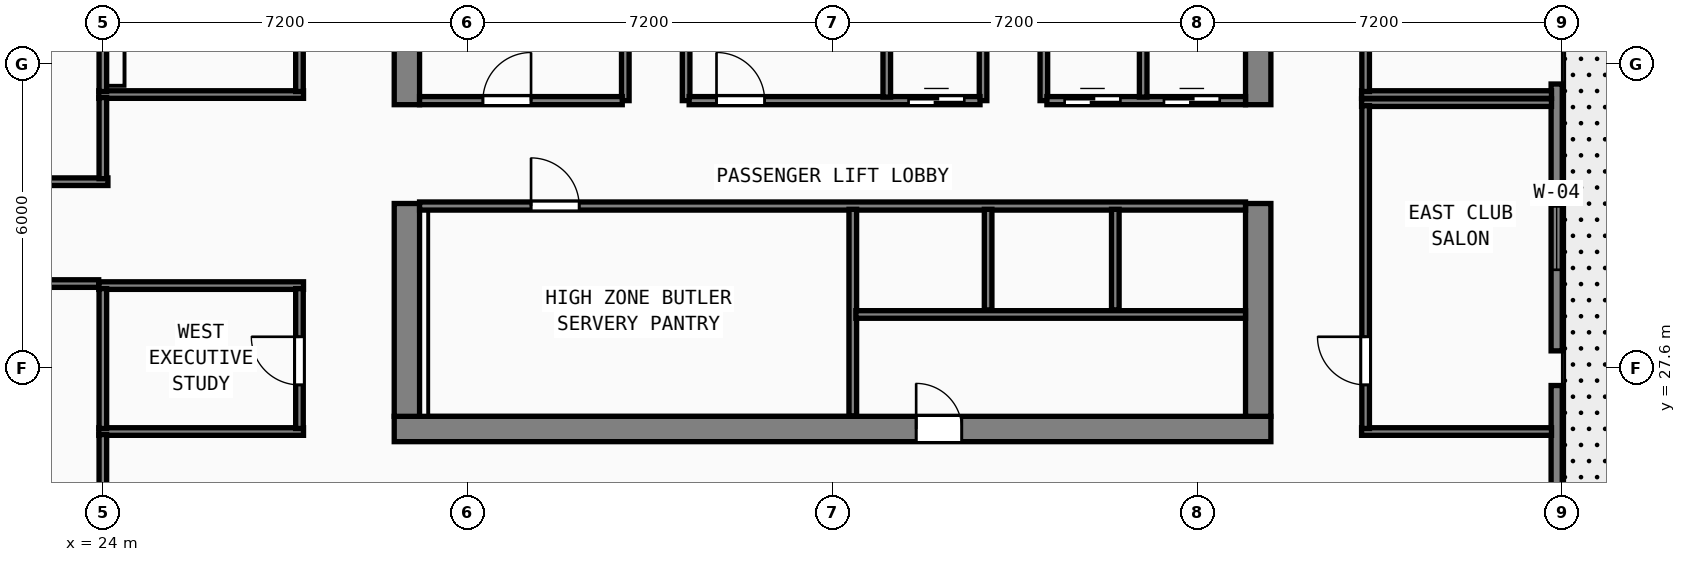
"""IFC4 building model, lengths in metres.
Left out: names, types, materials, properties, quantities, classifications, styles, units other than length and angle.
Written with IfcOpenShell. Run it as: python <this file> out.ifc"""

import sys

from ifc_helpers import new_model, si_unit, direction, frame, frame_2d, origin, origin_2d, place, context, subcontext, project, spatial, rectangle, hollow_rectangle, extrude, element, fill, save


model = new_model("IFC4")
c1 = context("Model", 3, precision=1e-05, world=origin(), true_north=direction((0.0, 1.0)))
c2 = subcontext(c1, "Body", "Model", "MODEL_VIEW")
j1 = project(units=[si_unit("LENGTHUNIT", "METRE"), si_unit("PLANEANGLEUNIT", "RADIAN")], contexts=[c1])
p1 = place(None, origin())
s1 = spatial("IfcSite", under=j1, at=p1, CompositionType="ELEMENT")
p2 = place(p1, origin())
s2 = spatial("IfcBuilding", under=s1, at=p2, CompositionType="ELEMENT")
p3 = place(p2, frame((0.0, 0.0, 235.2)))
s3 = spatial("IfcBuildingStorey", under=s2, at=p3, CompositionType="ELEMENT", Elevation=235.2)
p4 = place(p3, frame((29.75, 26.4, 0.0), z_axis=(0.0, 0.0, 1.0), x_axis=(1.0, 0.0, 0.0)))
e1 = element("IfcWall", 1, at=p4, inside=s3, PredefinedType="SHEAR", context=c2, shape_type="SweptSolid", body=[
    extrude(rectangle(XDim=17.3, YDim=0.5, at=frame_2d((8.65, 0.0))), origin(), (0.0, 0.0, 1.0), 3.67),
])
p5 = place(p4, frame((11.2, 0.0, 0.0), z_axis=(0.0, 0.0, 1.0), x_axis=(-1.0, 0.0, 0.0)))
e2 = element("IfcOpeningElement", 2, at=p5, cuts=e1, PredefinedType="OPENING", context=c2, shape_type="SweptSolid", body=[
    extrude(rectangle(XDim=0.9, YDim=2.1, at=frame_2d((0.45, 1.05))), frame((0.0, 0.26, 0.0), z_axis=(0.0, -1.0, 0.0), x_axis=(1.0, 0.0, 0.0)), (0.0, 0.0, 1.0), 0.52),
])
p6 = place(p3, frame((30.0, 26.65, 0.0), z_axis=(0.0, 0.0, 1.0), x_axis=(0.0, 1.0, 0.0)))
e3 = element("IfcWall", 3, at=p6, inside=s3, PredefinedType="SHEAR", context=c2, shape_type="SweptSolid", body=[
    extrude(rectangle(XDim=4.2, YDim=0.5, at=frame_2d((2.1, 0.0))), origin(), (0.0, 0.0, 1.0), 3.67),
])
p7 = place(p3, frame((30.0, 32.8, 0.0), z_axis=(0.0, 0.0, 1.0), x_axis=(0.0, 1.0, 0.0)))
e4 = element("IfcWall", 4, at=p7, inside=s3, PredefinedType="SHEAR", context=c2, shape_type="SweptSolid", body=[
    extrude(rectangle(XDim=10.15, YDim=0.5, at=frame_2d((5.075, 0.0))), origin(), (0.0, 0.0, 1.0), 3.67),
])
p8 = place(p3, frame((46.8, 26.65, 0.0), z_axis=(0.0, 0.0, 1.0), x_axis=(0.0, 1.0, 0.0)))
e5 = element("IfcWall", 5, at=p8, inside=s3, PredefinedType="SHEAR", context=c2, shape_type="SweptSolid", body=[
    extrude(rectangle(XDim=4.2, YDim=0.5, at=frame_2d((2.1, 0.0))), origin(), (0.0, 0.0, 1.0), 3.67),
])
p9 = place(p3, frame((46.8, 32.8, 0.0), z_axis=(0.0, 0.0, 1.0), x_axis=(0.0, 1.0, 0.0)))
e6 = element("IfcWall", 6, at=p9, inside=s3, PredefinedType="SHEAR", context=c2, shape_type="SweptSolid", body=[
    extrude(rectangle(XDim=10.15, YDim=0.5, at=frame_2d((5.075, 0.0))), origin(), (0.0, 0.0, 1.0), 3.67),
])
for number, where, z_axis, x_axis in (
    (7, (24.0, 33.6, 0.0), (0.0, 0.0, 1.0), (1.0, 0.0, 0.0)),
    (8, (52.8, 33.6, 0.0), (0.0, 0.0, 1.0), (1.0, 0.0, 0.0)),
):
    element("IfcColumn", number, at=place(p3, frame(where, z_axis=z_axis, x_axis=x_axis)), inside=s3, PredefinedType="COLUMN", context=c2, shape_type="SweptSolid", body=[
        extrude(hollow_rectangle(XDim=0.8, YDim=0.8, WallThickness=0.03, at=origin_2d()), origin(), (0.0, 0.0, 1.0), 3.85),
    ])
for number, where, z_axis, x_axis in (
    (9, (24.0, 27.6, 0.0), (0.0, 0.0, 1.0), (1.0, 0.0, 0.0)),
    (10, (52.8, 27.6, 0.0), (0.0, 0.0, 1.0), (1.0, 0.0, 0.0)),
):
    element("IfcColumn", number, at=place(p3, frame(where, z_axis=z_axis, x_axis=x_axis)), inside=s3, PredefinedType="COLUMN", context=c2, shape_type="SweptSolid", body=[
        extrude(hollow_rectangle(XDim=0.7, YDim=0.7, WallThickness=0.026, at=origin_2d()), origin(), (0.0, 0.0, 1.0), 3.85),
    ])
p10 = place(p3, frame((52.69, 21.992, 0.0), z_axis=(0.0, 0.0, 1.0), x_axis=(0.0, 1.0, 0.0)))
e11 = element("IfcWall", 11, at=p10, inside=s3, PredefinedType="SOLIDWALL", context=c2, shape_type="SweptSolid", body=[
    extrude(rectangle(XDim=5.266, YDim=0.22, at=frame_2d((2.633, 0.0))), origin(), (0.0, 0.0, 1.0), 3.315),
])
p11 = place(p10, frame((1.72, 0.0, 0.0), z_axis=(0.0, 0.0, 1.0), x_axis=(-1.0, 0.0, 0.0)))
e12 = element("IfcOpeningElement", 12, at=p11, cuts=e11, PredefinedType="OPENING", context=c2, shape_type="SweptSolid", body=[
    extrude(rectangle(XDim=1.5, YDim=2.2, at=frame_2d((0.75, 1.1))), frame((0.0, 0.12, 0.0), z_axis=(0.0, -1.0, 0.0), x_axis=(1.0, 0.0, 0.0)), (0.0, 0.0, 1.0), 0.24),
])
p12 = place(p3, frame((52.69, 27.942, 0.0), z_axis=(0.0, 0.0, 1.0), x_axis=(0.0, 1.0, 0.0)))
e13 = element("IfcWall", 13, at=p12, inside=s3, PredefinedType="SOLIDWALL", context=c2, shape_type="SweptSolid", body=[
    extrude(rectangle(XDim=5.266, YDim=0.22, at=frame_2d((2.633, 0.0))), origin(), (0.0, 0.0, 1.0), 3.315),
])
p13 = place(p12, frame((1.6, 0.0, 0.85)))
e14 = element("IfcOpeningElement", 14, at=p13, cuts=e13, PredefinedType="OPENING", context=c2, shape_type="SweptSolid", body=[
    extrude(rectangle(XDim=1.25, YDim=1.95, at=frame_2d((0.625, 0.975))), frame((0.0, 0.12, 0.0), z_axis=(0.0, -1.0, 0.0), x_axis=(1.0, 0.0, 0.0)), (0.0, 0.0, 1.0), 0.24),
])
for number, where, z_axis, x_axis in (
    (15, (34.31, 32.88, 0.0), (0.0, 0.0, 1.0), (0.0, 1.0, 0.0)),
    (16, (35.51, 32.88, 0.0), (0.0, 0.0, 1.0), (0.0, 1.0, 0.0)),
    (17, (41.37, 32.88, 0.0), (0.0, 0.0, 1.0), (0.0, 1.0, 0.0)),
    (18, (42.57, 32.88, 0.0), (0.0, 0.0, 1.0), (0.0, 1.0, 0.0)),
):
    element("IfcWall", number, at=place(p3, frame(where, z_axis=z_axis, x_axis=x_axis)), inside=s3, PredefinedType="SOLIDWALL", context=c2, shape_type="SweptSolid", body=[
        extrude(rectangle(XDim=2.17, YDim=0.15, at=frame_2d((1.085, 0.0))), origin(), (0.0, 0.0, 1.0), 3.67),
    ])
p14 = place(p3, frame((30.25, 32.88, 0.0), z_axis=(0.0, 0.0, 1.0), x_axis=(1.0, 0.0, 0.0)))
e19 = element("IfcWall", 19, at=p14, inside=s3, PredefinedType="SOLIDWALL", context=c2, shape_type="SweptSolid", body=[
    extrude(rectangle(XDim=4.0, YDim=0.16, at=frame_2d((2.0, 0.0))), origin(), (0.0, 0.0, 1.0), 3.67),
])
p15 = place(p14, frame((2.2, 0.0, 0.0), z_axis=(0.0, 0.0, 1.0), x_axis=(-1.0, 0.0, 0.0)))
e20 = element("IfcOpeningElement", 20, at=p15, cuts=e19, PredefinedType="OPENING", context=c2, shape_type="SweptSolid", body=[
    extrude(rectangle(XDim=0.95, YDim=2.12, at=frame_2d((0.475, 1.06))), frame((0.0, 0.09, 0.0), z_axis=(0.0, -1.0, 0.0), x_axis=(1.0, 0.0, 0.0)), (0.0, 0.0, 1.0), 0.18),
])
p16 = place(p3, frame((35.57, 32.88, 0.0), z_axis=(0.0, 0.0, 1.0), x_axis=(1.0, 0.0, 0.0)))
e21 = element("IfcWall", 21, at=p16, inside=s3, PredefinedType="SOLIDWALL", context=c2, shape_type="SweptSolid", body=[
    extrude(rectangle(XDim=5.74, YDim=0.16, at=frame_2d((2.87, 0.0))), origin(), (0.0, 0.0, 1.0), 3.67),
])
p17 = place(p16, frame((1.49, 0.0, 0.0), z_axis=(0.0, 0.0, 1.0), x_axis=(-1.0, 0.0, 0.0)))
e22 = element("IfcOpeningElement", 22, at=p17, cuts=e21, PredefinedType="OPENING", context=c2, shape_type="SweptSolid", body=[
    extrude(rectangle(XDim=0.95, YDim=2.12, at=frame_2d((0.475, 1.06))), frame((0.0, 0.09, 0.0), z_axis=(0.0, -1.0, 0.0), x_axis=(1.0, 0.0, 0.0)), (0.0, 0.0, 1.0), 0.18),
])
p18 = place(p16, frame((5.43, 0.0, 0.0), z_axis=(0.0, 0.0, 1.0), x_axis=(-1.0, 0.0, 0.0)))
e23 = element("IfcOpeningElement", 23, at=p18, cuts=e21, PredefinedType="OPENING", context=c2, shape_type="SweptSolid", body=[
    extrude(rectangle(XDim=1.1, YDim=2.2, at=frame_2d((0.55, 1.1))), frame((0.0, 0.09, 0.0), z_axis=(0.0, -1.0, 0.0), x_axis=(1.0, 0.0, 0.0)), (0.0, 0.0, 1.0), 0.18),
])
p19 = place(p3, frame((42.63, 32.88, 0.0), z_axis=(0.0, 0.0, 1.0), x_axis=(1.0, 0.0, 0.0)))
e24 = element("IfcWall", 24, at=p19, inside=s3, PredefinedType="SOLIDWALL", context=c2, shape_type="SweptSolid", body=[
    extrude(rectangle(XDim=3.92, YDim=0.16, at=frame_2d((1.96, 0.0))), origin(), (0.0, 0.0, 1.0), 3.67),
])
p20 = place(p19, frame((1.45, 0.0, 0.0), z_axis=(0.0, 0.0, 1.0), x_axis=(-1.0, 0.0, 0.0)))
e25 = element("IfcOpeningElement", 25, at=p20, cuts=e24, PredefinedType="OPENING", context=c2, shape_type="SweptSolid", body=[
    extrude(rectangle(XDim=1.1, YDim=2.2, at=frame_2d((0.55, 1.1))), frame((0.0, 0.09, 0.0), z_axis=(0.0, -1.0, 0.0), x_axis=(1.0, 0.0, 0.0)), (0.0, 0.0, 1.0), 0.18),
])
p21 = place(p19, frame((3.41, 0.0, 0.0), z_axis=(0.0, 0.0, 1.0), x_axis=(-1.0, 0.0, 0.0)))
e26 = element("IfcOpeningElement", 26, at=p21, cuts=e24, PredefinedType="OPENING", context=c2, shape_type="SweptSolid", body=[
    extrude(rectangle(XDim=1.1, YDim=2.2, at=frame_2d((0.55, 1.1))), frame((0.0, 0.09, 0.0), z_axis=(0.0, -1.0, 0.0), x_axis=(1.0, 0.0, 0.0)), (0.0, 0.0, 1.0), 0.18),
])
for number, where, z_axis, x_axis in (
    (27, (39.47, 32.95, 0.0), (0.0, 0.0, 1.0), (0.0, 1.0, 0.0)),
    (28, (44.53, 32.95, 0.0), (0.0, 0.0, 1.0), (0.0, 1.0, 0.0)),
):
    element("IfcWall", number, at=place(p3, frame(where, z_axis=z_axis, x_axis=x_axis)), inside=s3, PredefinedType="SOLIDWALL", context=c2, shape_type="SweptSolid", body=[
        extrude(rectangle(XDim=2.05, YDim=0.15, at=frame_2d((1.025, 0.0))), origin(), (0.0, 0.0, 1.0), 3.67),
    ])
p22 = place(p3, frame((30.25, 30.8, 0.0), z_axis=(0.0, 0.0, 1.0), x_axis=(1.0, 0.0, 0.0)))
e29 = element("IfcWall", 29, at=p22, inside=s3, PredefinedType="SOLIDWALL", context=c2, shape_type="SweptSolid", body=[
    extrude(rectangle(XDim=16.3, YDim=0.16, at=frame_2d((8.15, 0.0))), origin(), (0.0, 0.0, 1.0), 3.67),
])
p23 = place(p22, frame((2.2, 0.0, 0.0)))
e30 = element("IfcOpeningElement", 30, at=p23, cuts=e29, PredefinedType="OPENING", context=c2, shape_type="SweptSolid", body=[
    extrude(rectangle(XDim=0.95, YDim=2.12, at=frame_2d((0.475, 1.06))), frame((0.0, 0.09, 0.0), z_axis=(0.0, -1.0, 0.0), x_axis=(1.0, 0.0, 0.0)), (0.0, 0.0, 1.0), 0.18),
])
p24 = place(p3, frame((38.8, 26.66, 0.0), z_axis=(0.0, 0.0, 1.0), x_axis=(0.0, 1.0, 0.0)))
e31 = element("IfcWall", 31, at=p24, inside=s3, PredefinedType="SOLIDWALL", context=c2, shape_type="SweptSolid", body=[
    extrude(rectangle(XDim=4.075, YDim=0.15, at=frame_2d((2.038, 0.0))), origin(), (0.0, 0.0, 1.0), 3.67),
])
p25 = place(p3, frame((38.86, 28.66, 0.0), z_axis=(0.0, 0.0, 1.0), x_axis=(1.0, 0.0, 0.0)))
e32 = element("IfcWall", 32, at=p25, inside=s3, PredefinedType="PARTITIONING", context=c2, shape_type="SweptSolid", body=[
    extrude(rectangle(XDim=7.69, YDim=0.15, at=frame_2d((3.845, 0.0))), origin(), (0.0, 0.0, 1.0), 3.67),
])
for number, where, z_axis, x_axis in (
    (33, (41.47, 28.75, 0.0), (0.0, 0.0, 1.0), (0.0, 1.0, 0.0)),
    (34, (43.98, 28.75, 0.0), (0.0, 0.0, 1.0), (0.0, 1.0, 0.0)),
):
    element("IfcWall", number, at=place(p3, frame(where, z_axis=z_axis, x_axis=x_axis)), inside=s3, PredefinedType="SOLIDWALL", context=c2, shape_type="SweptSolid", body=[
        extrude(rectangle(XDim=1.985, YDim=0.15, at=frame_2d((0.993, 0.0))), origin(), (0.0, 0.0, 1.0), 3.67),
    ])
p26 = place(p3, frame((23.92, 33.0, 0.0), z_axis=(0.0, 0.0, 1.0), x_axis=(1.0, 0.0, 0.0)))
e35 = element("IfcWall", 35, at=p26, inside=s3, PredefinedType="PARTITIONING", context=c2, shape_type="SweptSolid", body=[
    extrude(rectangle(XDim=4.04, YDim=0.15, at=frame_2d((2.02, 0.0))), origin(), (0.0, 0.0, 1.0), 3.67),
])
p27 = place(p3, frame((24.0, 33.06, 0.0), z_axis=(0.0, 0.0, 1.0), x_axis=(0.0, 1.0, 0.0)))
e36 = element("IfcWall", 36, at=p27, inside=s3, PredefinedType="PARTITIONING", context=c2, shape_type="SweptSolid", body=[
    extrude(rectangle(XDim=5.08, YDim=0.15, at=frame_2d((2.54, 0.0))), origin(), (0.0, 0.0, 1.0), 3.315),
])
p28 = place(p3, frame((27.88, 33.06, 0.0), z_axis=(0.0, 0.0, 1.0), x_axis=(0.0, 1.0, 0.0)))
e37 = element("IfcWall", 37, at=p28, inside=s3, PredefinedType="PARTITIONING", context=c2, shape_type="SweptSolid", body=[
    extrude(rectangle(XDim=5.08, YDim=0.15, at=frame_2d((2.54, 0.0))), origin(), (0.0, 0.0, 1.0), 3.67),
])
p29 = place(p28, frame((2.41, 0.0, 0.0), z_axis=(0.0, 0.0, 1.0), x_axis=(-1.0, 0.0, 0.0)))
e38 = element("IfcOpeningElement", 38, at=p29, cuts=e37, PredefinedType="OPENING", context=c2, shape_type="SweptSolid", body=[
    extrude(rectangle(XDim=0.95, YDim=2.12, at=frame_2d((0.475, 1.06))), frame((0.0, 0.085, 0.0), z_axis=(0.0, -1.0, 0.0), x_axis=(1.0, 0.0, 0.0)), (0.0, 0.0, 1.0), 0.17),
])
p30 = place(p3, frame((48.84, 33.0, 0.0), z_axis=(0.0, 0.0, 1.0), x_axis=(1.0, 0.0, 0.0)))
e39 = element("IfcWall", 39, at=p30, inside=s3, PredefinedType="PARTITIONING", context=c2, shape_type="SweptSolid", body=[
    extrude(rectangle(XDim=3.748, YDim=0.15, at=frame_2d((1.874, 0.0))), origin(), (0.0, 0.0, 1.0), 3.67),
])
p31 = place(p3, frame((48.92, 33.06, 0.0), z_axis=(0.0, 0.0, 1.0), x_axis=(0.0, 1.0, 0.0)))
e40 = element("IfcWall", 40, at=p31, inside=s3, PredefinedType="PARTITIONING", context=c2, shape_type="SweptSolid", body=[
    extrude(rectangle(XDim=3.28, YDim=0.15, at=frame_2d((1.64, 0.0))), origin(), (0.0, 0.0, 1.0), 3.67),
])
p32 = place(p31, frame((0.86, 0.0, 0.0)))
e41 = element("IfcOpeningElement", 41, at=p32, cuts=e40, PredefinedType="OPENING", context=c2, shape_type="SweptSolid", body=[
    extrude(rectangle(XDim=0.95, YDim=2.12, at=frame_2d((0.475, 1.06))), frame((0.0, 0.085, 0.0), z_axis=(0.0, -1.0, 0.0), x_axis=(1.0, 0.0, 0.0)), (0.0, 0.0, 1.0), 0.17),
])
for number, where, z_axis, x_axis in (
    (42, (23.92, 29.23, 0.0), (0.0, 0.0, 1.0), (1.0, 0.0, 0.0)),
    (43, (23.92, 26.35, 0.0), (0.0, 0.0, 1.0), (1.0, 0.0, 0.0)),
):
    element("IfcWall", number, at=place(p3, frame(where, z_axis=z_axis, x_axis=x_axis)), inside=s3, PredefinedType="PARTITIONING", context=c2, shape_type="SweptSolid", body=[
        extrude(rectangle(XDim=4.04, YDim=0.15, at=frame_2d((2.02, 0.0))), origin(), (0.0, 0.0, 1.0), 3.67),
    ])
p33 = place(p3, frame((24.0, 26.41, 0.0), z_axis=(0.0, 0.0, 1.0), x_axis=(0.0, 1.0, 0.0)))
e44 = element("IfcWall", 44, at=p33, inside=s3, PredefinedType="PARTITIONING", context=c2, shape_type="SweptSolid", body=[
    extrude(rectangle(XDim=2.76, YDim=0.15, at=frame_2d((1.38, 0.0))), origin(), (0.0, 0.0, 1.0), 3.315),
])
p34 = place(p3, frame((27.88, 26.41, 0.0), z_axis=(0.0, 0.0, 1.0), x_axis=(0.0, 1.0, 0.0)))
e45 = element("IfcWall", 45, at=p34, inside=s3, PredefinedType="PARTITIONING", context=c2, shape_type="SweptSolid", body=[
    extrude(rectangle(XDim=2.76, YDim=0.15, at=frame_2d((1.38, 0.0))), origin(), (0.0, 0.0, 1.0), 3.67),
])
p35 = place(p34, frame((1.81, 0.0, 0.0), z_axis=(0.0, 0.0, 1.0), x_axis=(-1.0, 0.0, 0.0)))
e46 = element("IfcOpeningElement", 46, at=p35, cuts=e45, PredefinedType="OPENING", context=c2, shape_type="SweptSolid", body=[
    extrude(rectangle(XDim=0.95, YDim=2.12, at=frame_2d((0.475, 1.06))), frame((0.0, 0.085, 0.0), z_axis=(0.0, -1.0, 0.0), x_axis=(1.0, 0.0, 0.0)), (0.0, 0.0, 1.0), 0.17),
])
for number, where, z_axis, x_axis in (
    (47, (48.84, 32.84, 0.0), (0.0, 0.0, 1.0), (1.0, 0.0, 0.0)),
    (48, (48.84, 26.35, 0.0), (0.0, 0.0, 1.0), (1.0, 0.0, 0.0)),
):
    element("IfcWall", number, at=place(p3, frame(where, z_axis=z_axis, x_axis=x_axis)), inside=s3, PredefinedType="PARTITIONING", context=c2, shape_type="SweptSolid", body=[
        extrude(rectangle(XDim=3.748, YDim=0.15, at=frame_2d((1.874, 0.0))), origin(), (0.0, 0.0, 1.0), 3.67),
    ])
p36 = place(p3, frame((48.92, 26.41, 0.0), z_axis=(0.0, 0.0, 1.0), x_axis=(0.0, 1.0, 0.0)))
e49 = element("IfcWall", 49, at=p36, inside=s3, PredefinedType="PARTITIONING", context=c2, shape_type="SweptSolid", body=[
    extrude(rectangle(XDim=6.37, YDim=0.15, at=frame_2d((3.185, 0.0))), origin(), (0.0, 0.0, 1.0), 3.67),
])
p37 = place(p36, frame((0.86, 0.0, 0.0)))
e50 = element("IfcOpeningElement", 50, at=p37, cuts=e49, PredefinedType="OPENING", context=c2, shape_type="SweptSolid", body=[
    extrude(rectangle(XDim=0.95, YDim=2.12, at=frame_2d((0.475, 1.06))), frame((0.0, 0.085, 0.0), z_axis=(0.0, -1.0, 0.0), x_axis=(1.0, 0.0, 0.0)), (0.0, 0.0, 1.0), 0.17),
])
p38 = place(p3, frame((18.312, 31.28, 0.0), z_axis=(0.0, 0.0, 1.0), x_axis=(1.0, 0.0, 0.0)))
e51 = element("IfcWall", 51, at=p38, inside=s3, PredefinedType="PARTITIONING", context=c2, shape_type="SweptSolid", body=[
    extrude(rectangle(XDim=5.788, YDim=0.15, at=frame_2d((2.894, 0.0))), origin(), (0.0, 0.0, 1.0), 3.67),
])
p39 = place(p38, frame((0.14, 0.0, 0.0)))
e52 = element("IfcOpeningElement", 52, at=p39, cuts=e51, PredefinedType="OPENING", context=c2, shape_type="SweptSolid", body=[
    extrude(rectangle(XDim=0.95, YDim=2.18, at=frame_2d((0.475, 1.09))), frame((0.0, 0.085, 0.0), z_axis=(0.0, -1.0, 0.0), x_axis=(1.0, 0.0, 0.0)), (0.0, 0.0, 1.0), 0.17),
])
p40 = place(p3, frame((24.0, 31.34, 0.0), z_axis=(0.0, 0.0, 1.0), x_axis=(0.0, 1.0, 0.0)))
e53 = element("IfcWall", 53, at=p40, inside=s3, PredefinedType="PARTITIONING", context=c2, shape_type="SweptSolid", body=[
    extrude(rectangle(XDim=1.6, YDim=0.15, at=frame_2d((0.8, 0.0))), origin(), (0.0, 0.0, 1.0), 3.315),
])
p41 = place(p3, frame((18.312, 29.27, 0.0), z_axis=(0.0, 0.0, 1.0), x_axis=(1.0, 0.0, 0.0)))
e54 = element("IfcWall", 54, at=p41, inside=s3, PredefinedType="PARTITIONING", context=c2, shape_type="SweptSolid", body=[
    extrude(rectangle(XDim=5.606, YDim=0.15, at=frame_2d((2.803, 0.0))), origin(), (0.0, 0.0, 1.0), 3.67),
])
p42 = place(p41, frame((1.09, 0.0, 0.0), z_axis=(0.0, 0.0, 1.0), x_axis=(-1.0, 0.0, 0.0)))
e55 = element("IfcOpeningElement", 55, at=p42, cuts=e54, PredefinedType="OPENING", context=c2, shape_type="SweptSolid", body=[
    extrude(rectangle(XDim=0.95, YDim=2.15, at=frame_2d((0.475, 1.075))), frame((0.0, 0.085, 0.0), z_axis=(0.0, -1.0, 0.0), x_axis=(1.0, 0.0, 0.0)), (0.0, 0.0, 1.0), 0.17),
])
p43 = place(p3, frame((24.0, 24.34, 0.0), z_axis=(0.0, 0.0, 1.0), x_axis=(0.0, 1.0, 0.0)))
e56 = element("IfcWall", 56, at=p43, inside=s3, PredefinedType="PARTITIONING", context=c2, shape_type="SweptSolid", body=[
    extrude(rectangle(XDim=1.95, YDim=0.15, at=frame_2d((0.975, 0.0))), origin(), (0.0, 0.0, 1.0), 3.315),
])
p44 = place(p13, origin())
e57 = element("IfcWindow", 57, at=p44, inside=s3, PartitioningType="SINGLE_PANEL", PredefinedType="WINDOW", context=c2, shape_type="SweptSolid", body=[
    extrude(rectangle(XDim=1.25, YDim=1.95, at=frame_2d((0.625, 0.975))), frame((0.0, 0.03, 0.0), z_axis=(0.0, -1.0, 0.0), x_axis=(1.0, 0.0, 0.0)), (0.0, 0.0, 1.0), 0.06),
])
fill(e14, e57)
p45 = place(p15, origin())
e58 = element("IfcDoor", 58, at=p45, inside=s3, OperationType="SINGLE_SWING_LEFT", PredefinedType="DOOR", context=c2, shape_type="SweptSolid", body=[
    extrude(rectangle(XDim=0.95, YDim=2.12, at=frame_2d((0.475, 1.06))), frame((0.0, 0.025, 0.0), z_axis=(0.0, -1.0, 0.0), x_axis=(1.0, 0.0, 0.0)), (0.0, 0.0, 1.0), 0.05),
])
fill(e20, e58)
p46 = place(p17, origin())
e59 = element("IfcDoor", 59, at=p46, inside=s3, OperationType="SINGLE_SWING_RIGHT", PredefinedType="DOOR", context=c2, shape_type="SweptSolid", body=[
    extrude(rectangle(XDim=0.95, YDim=2.12, at=frame_2d((0.475, 1.06))), frame((0.0, 0.025, 0.0), z_axis=(0.0, -1.0, 0.0), x_axis=(1.0, 0.0, 0.0)), (0.0, 0.0, 1.0), 0.05),
])
fill(e22, e59)
p47 = place(p18, origin())
e60 = element("IfcDoor", 60, at=p47, inside=s3, OperationType="SLIDING_TO_RIGHT", PredefinedType="DOOR", context=c2, shape_type="SweptSolid", body=[
    extrude(rectangle(XDim=1.1, YDim=2.2, at=frame_2d((0.55, 1.1))), frame((0.0, 0.025, 0.0), z_axis=(0.0, -1.0, 0.0), x_axis=(1.0, 0.0, 0.0)), (0.0, 0.0, 1.0), 0.05),
])
fill(e23, e60)
p48 = place(p20, origin())
e61 = element("IfcDoor", 61, at=p48, inside=s3, OperationType="SLIDING_TO_RIGHT", PredefinedType="DOOR", context=c2, shape_type="SweptSolid", body=[
    extrude(rectangle(XDim=1.1, YDim=2.2, at=frame_2d((0.55, 1.1))), frame((0.0, 0.025, 0.0), z_axis=(0.0, -1.0, 0.0), x_axis=(1.0, 0.0, 0.0)), (0.0, 0.0, 1.0), 0.05),
])
fill(e25, e61)
p49 = place(p21, origin())
e62 = element("IfcDoor", 62, at=p49, inside=s3, OperationType="SLIDING_TO_RIGHT", PredefinedType="DOOR", context=c2, shape_type="SweptSolid", body=[
    extrude(rectangle(XDim=1.1, YDim=2.2, at=frame_2d((0.55, 1.1))), frame((0.0, 0.025, 0.0), z_axis=(0.0, -1.0, 0.0), x_axis=(1.0, 0.0, 0.0)), (0.0, 0.0, 1.0), 0.05),
])
fill(e26, e62)
p50 = place(p23, origin())
e63 = element("IfcDoor", 63, at=p50, inside=s3, OperationType="SINGLE_SWING_LEFT", PredefinedType="DOOR", context=c2, shape_type="SweptSolid", body=[
    extrude(rectangle(XDim=0.95, YDim=2.12, at=frame_2d((0.475, 1.06))), frame((0.0, 0.025, 0.0), z_axis=(0.0, -1.0, 0.0), x_axis=(1.0, 0.0, 0.0)), (0.0, 0.0, 1.0), 0.05),
])
fill(e30, e63)
p51 = place(p5, origin())
e64 = element("IfcDoor", 64, at=p51, inside=s3, OperationType="SINGLE_SWING_RIGHT", PredefinedType="DOOR", context=c2, shape_type="SweptSolid", body=[
    extrude(rectangle(XDim=0.9, YDim=2.1, at=frame_2d((0.45, 1.05))), frame((0.0, -0.195, 0.0), z_axis=(0.0, -1.0, 0.0), x_axis=(1.0, 0.0, 0.0)), (0.0, 0.0, 1.0), 0.05),
])
fill(e2, e64)
p52 = place(p35, origin())
e65 = element("IfcDoor", 65, at=p52, inside=s3, OperationType="SINGLE_SWING_LEFT", PredefinedType="DOOR", context=c2, shape_type="SweptSolid", body=[
    extrude(rectangle(XDim=0.95, YDim=2.12, at=frame_2d((0.475, 1.06))), frame((0.0, 0.025, 0.0), z_axis=(0.0, -1.0, 0.0), x_axis=(1.0, 0.0, 0.0)), (0.0, 0.0, 1.0), 0.05),
])
fill(e46, e65)
p53 = place(p37, origin())
e66 = element("IfcDoor", 66, at=p53, inside=s3, OperationType="SINGLE_SWING_RIGHT", PredefinedType="DOOR", context=c2, shape_type="SweptSolid", body=[
    extrude(rectangle(XDim=0.95, YDim=2.12, at=frame_2d((0.475, 1.06))), frame((0.0, 0.025, 0.0), z_axis=(0.0, -1.0, 0.0), x_axis=(1.0, 0.0, 0.0)), (0.0, 0.0, 1.0), 0.05),
])
fill(e50, e66)
save(model, sys.argv[1])
